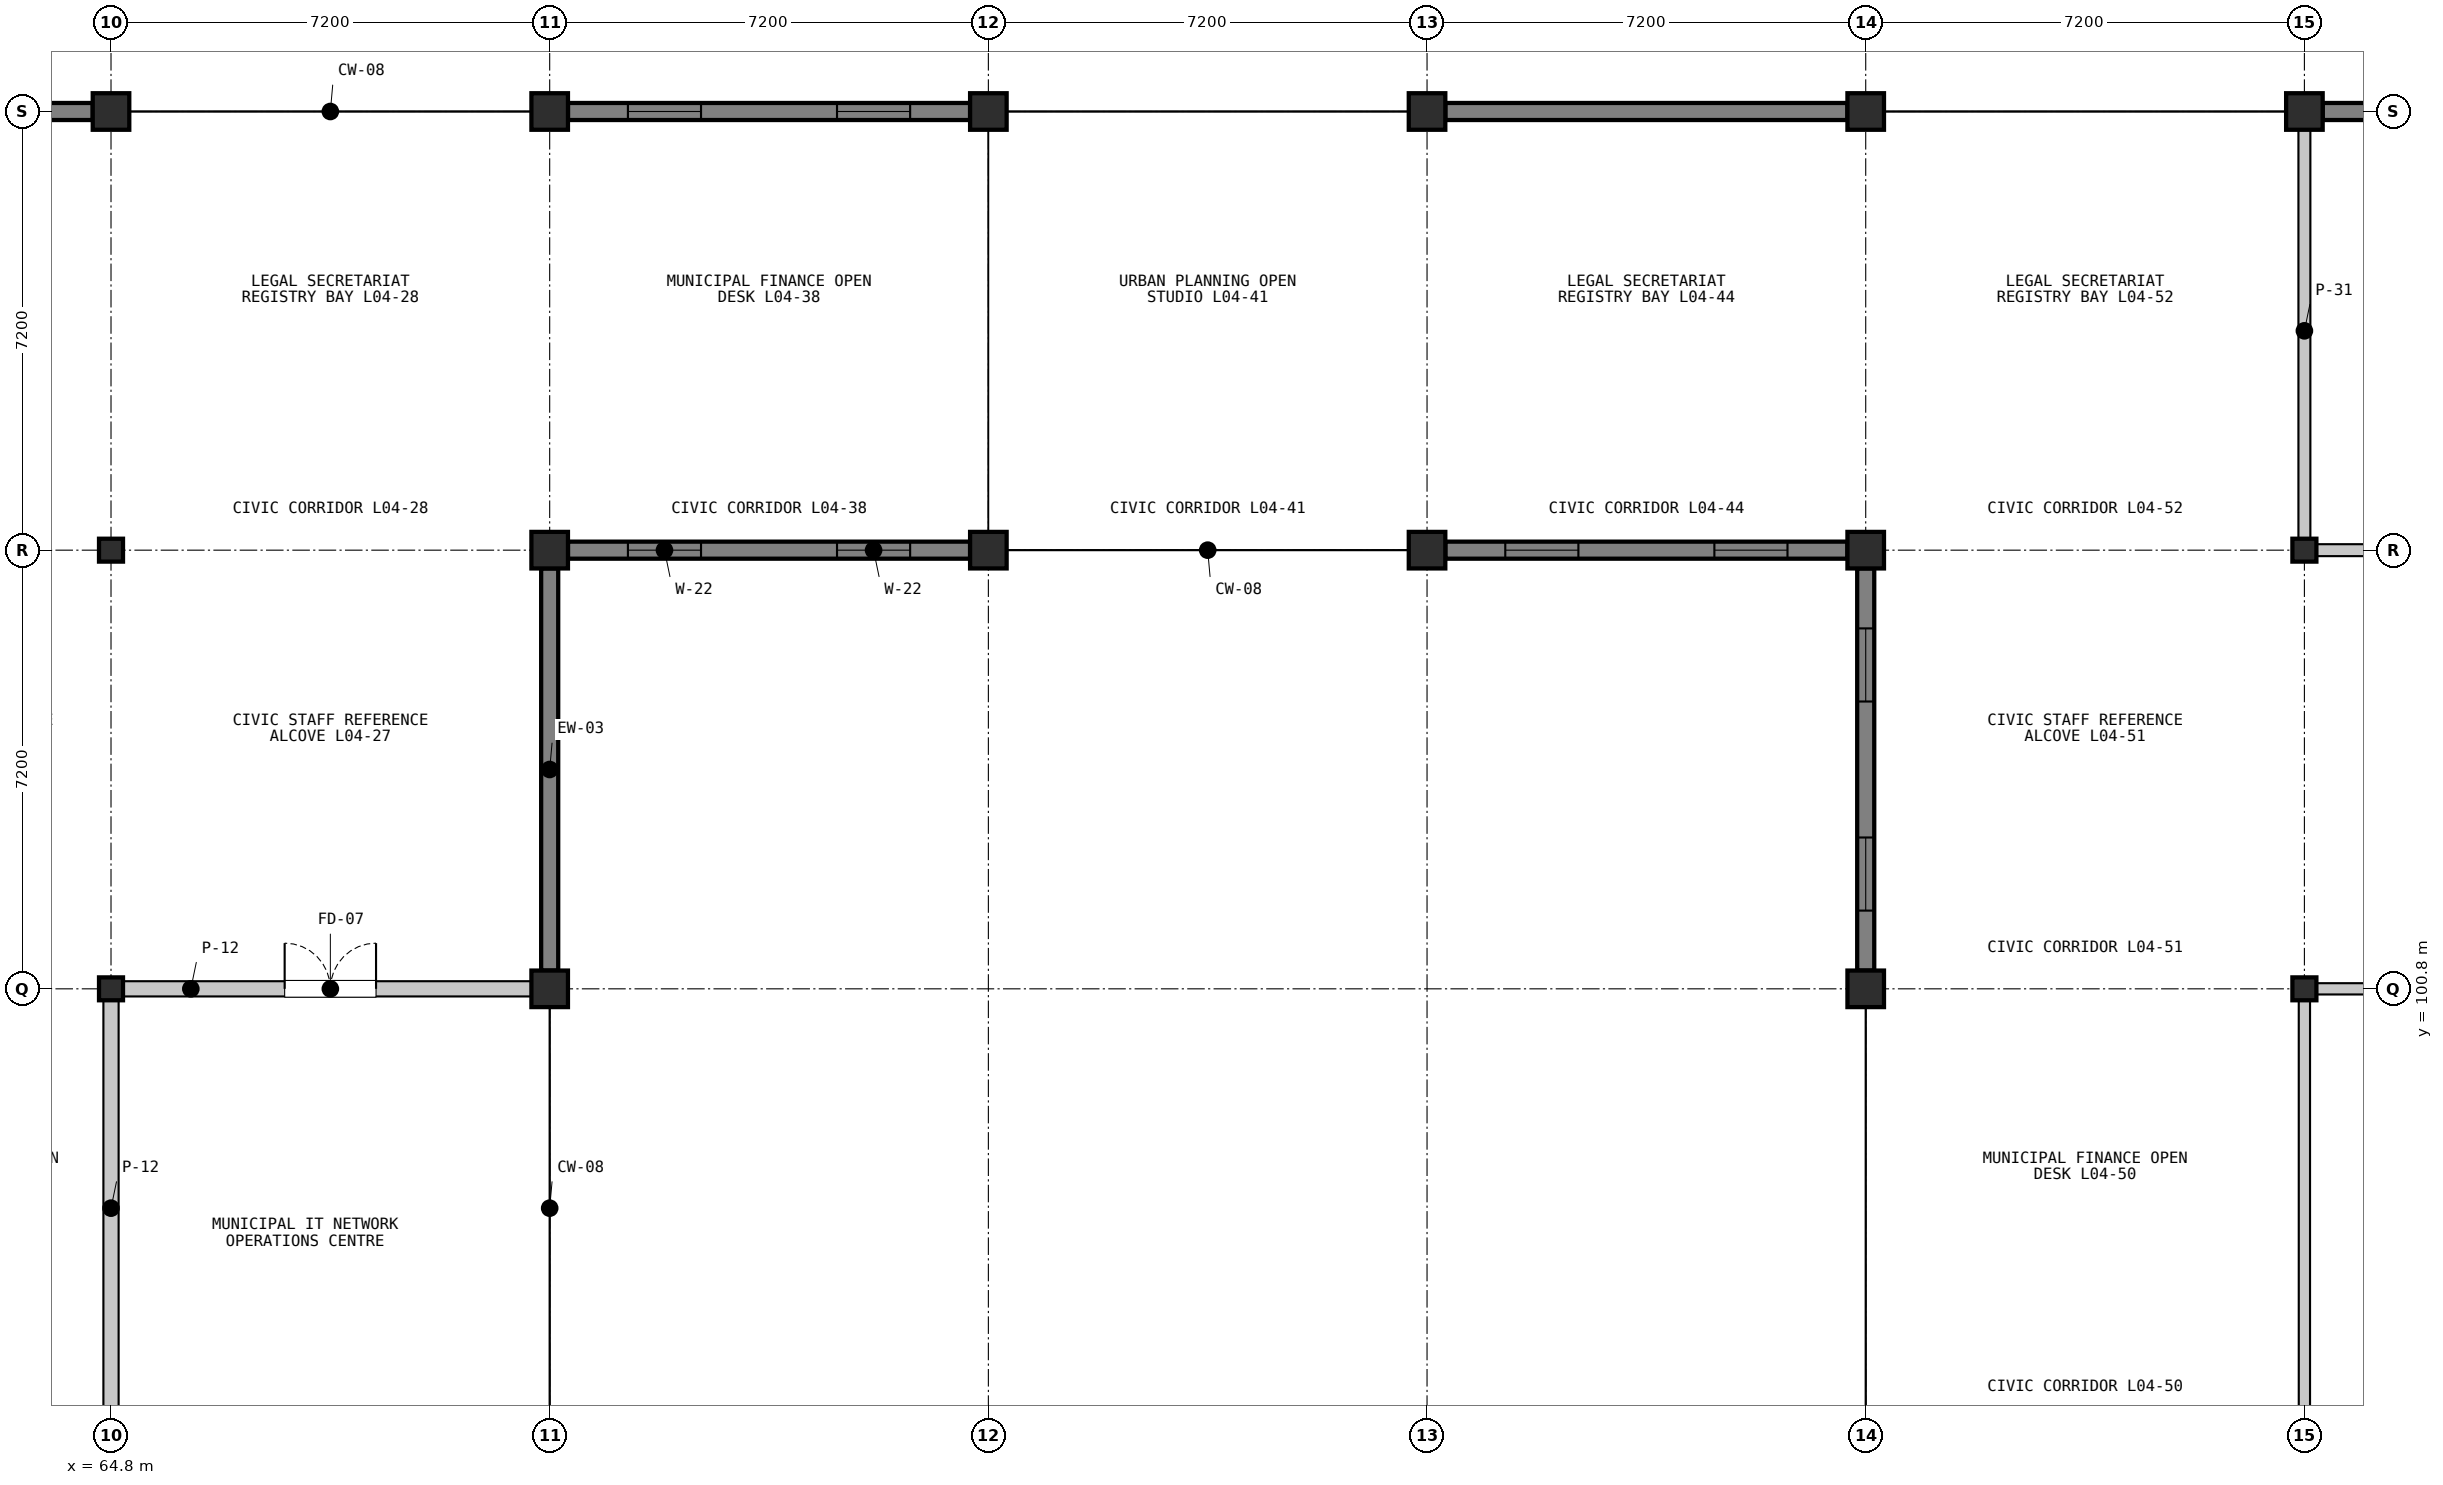
"""IFC4 building model, lengths in metres.
Left out: names, types, materials, properties, quantities, classifications, styles, units other than length and angle.
Written with IfcOpenShell. Run it as: python <this file> out.ifc"""

import sys

from ifc_helpers import new_model, si_unit, direction, frame, frame_2d, origin, origin_2d, place, context, subcontext, project, spatial, rectangle, i_section, extrude, element, fill, save


model = new_model("IFC4")
c1 = context("Model", 3, precision=1e-05, world=origin(), true_north=direction((0.0, 1.0)))
c2 = subcontext(c1, "Body", "Model", "MODEL_VIEW")
j1 = project(units=[si_unit("LENGTHUNIT", "METRE"), si_unit("PLANEANGLEUNIT", "RADIAN")], contexts=[c1])
p1 = place(None, origin())
s1 = spatial("IfcSite", under=j1, at=p1, CompositionType="ELEMENT")
p2 = place(p1, origin())
s2 = spatial("IfcBuilding", under=s1, at=p2, CompositionType="ELEMENT")
p3 = place(p2, frame((0.0, 0.0, 14.1)))
s3 = spatial("IfcBuildingStorey", under=s2, at=p3, CompositionType="ELEMENT", Elevation=14.1)
for number, where, z_axis, x_axis in (
    (1, (64.8, 100.8, 0.0), (0.0, 0.0, 1.0), (1.0, 0.0, 0.0)),
    (2, (64.8, 108.0, 0.0), (0.0, 0.0, 1.0), (1.0, 0.0, 0.0)),
):
    element("IfcColumn", number, at=place(p3, frame(where, z_axis=z_axis, x_axis=x_axis)), inside=s3, PredefinedType="COLUMN", context=c2, shape_type="SweptSolid", body=[
        extrude(i_section(OverallWidth=0.394, OverallDepth=0.376, WebThickness=0.017, FlangeThickness=0.028, FilletRadius=0.015, at=origin_2d()), origin(), (0.0, 0.0, 1.0), 3.9),
    ])
for number, where, z_axis, x_axis in (
    (3, (64.8, 115.2, 0.0), (0.0, 0.0, 1.0), (1.0, 0.0, 0.0)),
    (4, (72.0, 100.8, 0.0), (0.0, 0.0, 1.0), (1.0, 0.0, 0.0)),
    (5, (72.0, 108.0, 0.0), (0.0, 0.0, 1.0), (1.0, 0.0, 0.0)),
    (6, (72.0, 115.2, 0.0), (0.0, 0.0, 1.0), (1.0, 0.0, 0.0)),
    (7, (79.2, 108.0, 0.0), (0.0, 0.0, 1.0), (1.0, 0.0, 0.0)),
    (8, (79.2, 115.2, 0.0), (0.0, 0.0, 1.0), (1.0, 0.0, 0.0)),
    (9, (86.4, 108.0, 0.0), (0.0, 0.0, 1.0), (1.0, 0.0, 0.0)),
    (10, (86.4, 115.2, 0.0), (0.0, 0.0, 1.0), (1.0, 0.0, 0.0)),
    (11, (93.6, 100.8, 0.0), (0.0, 0.0, 1.0), (1.0, 0.0, 0.0)),
    (12, (93.6, 108.0, 0.0), (0.0, 0.0, 1.0), (1.0, 0.0, 0.0)),
    (13, (93.6, 115.2, 0.0), (0.0, 0.0, 1.0), (1.0, 0.0, 0.0)),
):
    element("IfcColumn", number, at=place(p3, frame(where, z_axis=z_axis, x_axis=x_axis)), inside=s3, PredefinedType="COLUMN", context=c2, shape_type="SweptSolid", body=[
        extrude(rectangle(XDim=0.6, YDim=0.6, at=origin_2d()), origin(), (0.0, 0.0, 1.0), 3.9),
    ])
for number, where, z_axis, x_axis in (
    (14, (100.8, 100.8, 0.0), (0.0, 0.0, 1.0), (1.0, 0.0, 0.0)),
    (15, (100.8, 108.0, 0.0), (0.0, 0.0, 1.0), (1.0, 0.0, 0.0)),
):
    element("IfcColumn", number, at=place(p3, frame(where, z_axis=z_axis, x_axis=x_axis)), inside=s3, PredefinedType="COLUMN", context=c2, shape_type="SweptSolid", body=[
        extrude(i_section(OverallWidth=0.394, OverallDepth=0.376, WebThickness=0.017, FlangeThickness=0.028, FilletRadius=0.015, at=origin_2d()), origin(), (0.0, 0.0, 1.0), 3.9),
    ])
p4 = place(p3, frame((100.8, 115.2, 0.0), z_axis=(0.0, 0.0, 1.0), x_axis=(1.0, 0.0, 0.0)))
e16 = element("IfcColumn", 16, at=p4, inside=s3, PredefinedType="COLUMN", context=c2, shape_type="SweptSolid", body=[
    extrude(rectangle(XDim=0.6, YDim=0.6, at=origin_2d()), origin(), (0.0, 0.0, 1.0), 3.9),
])
p5 = place(p3, frame((57.9, 115.2, 0.0), z_axis=(0.0, 0.0, 1.0), x_axis=(1.0, 0.0, 0.0)))
e17 = element("IfcWall", 17, at=p5, inside=s3, PredefinedType="SOLIDWALL", context=c2, shape_type="SweptSolid", body=[
    extrude(rectangle(XDim=6.6, YDim=0.28, at=frame_2d((3.3, 0.0))), origin(), (0.0, 0.0, 1.0), 3.118),
])
p6 = place(p5, frame((0.984, 0.0, 0.95)))
e18 = element("IfcOpeningElement", 18, at=p6, cuts=e17, PredefinedType="OPENING", context=c2, shape_type="SweptSolid", body=[
    extrude(rectangle(XDim=1.2, YDim=1.7, at=frame_2d((0.6, 0.85))), frame((0.0, 0.15, 0.0), z_axis=(0.0, -1.0, 0.0), x_axis=(1.0, 0.0, 0.0)), (0.0, 0.0, 1.0), 0.3),
])
p7 = place(p5, frame((4.416, 0.0, 0.95)))
e19 = element("IfcOpeningElement", 19, at=p7, cuts=e17, PredefinedType="OPENING", context=c2, shape_type="SweptSolid", body=[
    extrude(rectangle(XDim=1.2, YDim=1.7, at=frame_2d((0.6, 0.85))), frame((0.0, 0.15, 0.0), z_axis=(0.0, -1.0, 0.0), x_axis=(1.0, 0.0, 0.0)), (0.0, 0.0, 1.0), 0.3),
])
p8 = place(p3, frame((72.0, 107.7, 0.0), z_axis=(0.0, 0.0, 1.0), x_axis=(0.0, -1.0, 0.0)))
e20 = element("IfcWall", 20, at=p8, inside=s3, PredefinedType="SOLIDWALL", context=c2, shape_type="SweptSolid", body=[
    extrude(rectangle(XDim=6.6, YDim=0.28, at=frame_2d((3.3, 0.0))), origin(), (0.0, 0.0, 1.0), 3.192),
])
p9 = place(p3, frame((78.9, 108.0, 0.0), z_axis=(0.0, 0.0, 1.0), x_axis=(-1.0, 0.0, 0.0)))
e21 = element("IfcWall", 21, at=p9, inside=s3, PredefinedType="SOLIDWALL", context=c2, shape_type="SweptSolid", body=[
    extrude(rectangle(XDim=6.6, YDim=0.28, at=frame_2d((3.3, 0.0))), origin(), (0.0, 0.0, 1.0), 3.118),
])
p10 = place(p9, frame((0.984, 0.0, 0.95)))
e22 = element("IfcOpeningElement", 22, at=p10, cuts=e21, PredefinedType="OPENING", context=c2, shape_type="SweptSolid", body=[
    extrude(rectangle(XDim=1.2, YDim=1.7, at=frame_2d((0.6, 0.85))), frame((0.0, 0.15, 0.0), z_axis=(0.0, -1.0, 0.0), x_axis=(1.0, 0.0, 0.0)), (0.0, 0.0, 1.0), 0.3),
])
p11 = place(p9, frame((4.416, 0.0, 0.95)))
e23 = element("IfcOpeningElement", 23, at=p11, cuts=e21, PredefinedType="OPENING", context=c2, shape_type="SweptSolid", body=[
    extrude(rectangle(XDim=1.2, YDim=1.7, at=frame_2d((0.6, 0.85))), frame((0.0, 0.15, 0.0), z_axis=(0.0, -1.0, 0.0), x_axis=(1.0, 0.0, 0.0)), (0.0, 0.0, 1.0), 0.3),
])
p12 = place(p3, frame((72.3, 115.2, 0.0), z_axis=(0.0, 0.0, 1.0), x_axis=(1.0, 0.0, 0.0)))
e24 = element("IfcWall", 24, at=p12, inside=s3, PredefinedType="SOLIDWALL", context=c2, shape_type="SweptSolid", body=[
    extrude(rectangle(XDim=6.6, YDim=0.28, at=frame_2d((3.3, 0.0))), origin(), (0.0, 0.0, 1.0), 3.118),
])
p13 = place(p12, frame((0.984, 0.0, 0.95)))
e25 = element("IfcOpeningElement", 25, at=p13, cuts=e24, PredefinedType="OPENING", context=c2, shape_type="SweptSolid", body=[
    extrude(rectangle(XDim=1.2, YDim=1.7, at=frame_2d((0.6, 0.85))), frame((0.0, 0.15, 0.0), z_axis=(0.0, -1.0, 0.0), x_axis=(1.0, 0.0, 0.0)), (0.0, 0.0, 1.0), 0.3),
])
p14 = place(p12, frame((4.416, 0.0, 0.95)))
e26 = element("IfcOpeningElement", 26, at=p14, cuts=e24, PredefinedType="OPENING", context=c2, shape_type="SweptSolid", body=[
    extrude(rectangle(XDim=1.2, YDim=1.7, at=frame_2d((0.6, 0.85))), frame((0.0, 0.15, 0.0), z_axis=(0.0, -1.0, 0.0), x_axis=(1.0, 0.0, 0.0)), (0.0, 0.0, 1.0), 0.3),
])
p15 = place(p3, frame((93.3, 108.0, 0.0), z_axis=(0.0, 0.0, 1.0), x_axis=(-1.0, 0.0, 0.0)))
e27 = element("IfcWall", 27, at=p15, inside=s3, PredefinedType="SOLIDWALL", context=c2, shape_type="SweptSolid", body=[
    extrude(rectangle(XDim=6.6, YDim=0.28, at=frame_2d((3.3, 0.0))), origin(), (0.0, 0.0, 1.0), 3.118),
])
p16 = place(p15, frame((0.984, 0.0, 0.95)))
e28 = element("IfcOpeningElement", 28, at=p16, cuts=e27, PredefinedType="OPENING", context=c2, shape_type="SweptSolid", body=[
    extrude(rectangle(XDim=1.2, YDim=1.7, at=frame_2d((0.6, 0.85))), frame((0.0, 0.15, 0.0), z_axis=(0.0, -1.0, 0.0), x_axis=(1.0, 0.0, 0.0)), (0.0, 0.0, 1.0), 0.3),
])
p17 = place(p15, frame((4.416, 0.0, 0.95)))
e29 = element("IfcOpeningElement", 29, at=p17, cuts=e27, PredefinedType="OPENING", context=c2, shape_type="SweptSolid", body=[
    extrude(rectangle(XDim=1.2, YDim=1.7, at=frame_2d((0.6, 0.85))), frame((0.0, 0.15, 0.0), z_axis=(0.0, -1.0, 0.0), x_axis=(1.0, 0.0, 0.0)), (0.0, 0.0, 1.0), 0.3),
])
p18 = place(p3, frame((86.7, 115.2, 0.0), z_axis=(0.0, 0.0, 1.0), x_axis=(1.0, 0.0, 0.0)))
e30 = element("IfcWall", 30, at=p18, inside=s3, PredefinedType="SOLIDWALL", context=c2, shape_type="SweptSolid", body=[
    extrude(rectangle(XDim=6.6, YDim=0.28, at=frame_2d((3.3, 0.0))), origin(), (0.0, 0.0, 1.0), 3.118),
])
p19 = place(p3, frame((93.6, 101.1, 0.0), z_axis=(0.0, 0.0, 1.0), x_axis=(0.0, 1.0, 0.0)))
e31 = element("IfcWall", 31, at=p19, inside=s3, PredefinedType="SOLIDWALL", context=c2, shape_type="SweptSolid", body=[
    extrude(rectangle(XDim=6.6, YDim=0.28, at=frame_2d((3.3, 0.0))), origin(), (0.0, 0.0, 1.0), 3.192),
])
p20 = place(p19, frame((0.984, 0.0, 0.95)))
e32 = element("IfcOpeningElement", 32, at=p20, cuts=e31, PredefinedType="OPENING", context=c2, shape_type="SweptSolid", body=[
    extrude(rectangle(XDim=1.2, YDim=1.7, at=frame_2d((0.6, 0.85))), frame((0.0, 0.15, 0.0), z_axis=(0.0, -1.0, 0.0), x_axis=(1.0, 0.0, 0.0)), (0.0, 0.0, 1.0), 0.3),
])
p21 = place(p19, frame((4.416, 0.0, 0.95)))
e33 = element("IfcOpeningElement", 33, at=p21, cuts=e31, PredefinedType="OPENING", context=c2, shape_type="SweptSolid", body=[
    extrude(rectangle(XDim=1.2, YDim=1.7, at=frame_2d((0.6, 0.85))), frame((0.0, 0.15, 0.0), z_axis=(0.0, -1.0, 0.0), x_axis=(1.0, 0.0, 0.0)), (0.0, 0.0, 1.0), 0.3),
])
p22 = place(p3, frame((101.1, 115.2, 0.0), z_axis=(0.0, 0.0, 1.0), x_axis=(1.0, 0.0, 0.0)))
e34 = element("IfcWall", 34, at=p22, inside=s3, PredefinedType="SOLIDWALL", context=c2, shape_type="SweptSolid", body=[
    extrude(rectangle(XDim=6.65, YDim=0.28, at=frame_2d((3.325, 0.0))), origin(), (0.0, 0.0, 1.0), 3.098),
])
p23 = place(p22, frame((0.996, 0.0, 0.95)))
e35 = element("IfcOpeningElement", 35, at=p23, cuts=e34, PredefinedType="OPENING", context=c2, shape_type="SweptSolid", body=[
    extrude(rectangle(XDim=1.2, YDim=1.7, at=frame_2d((0.6, 0.85))), frame((0.0, 0.15, 0.0), z_axis=(0.0, -1.0, 0.0), x_axis=(1.0, 0.0, 0.0)), (0.0, 0.0, 1.0), 0.3),
])
p24 = place(p22, frame((4.454, 0.0, 0.95)))
e36 = element("IfcOpeningElement", 36, at=p24, cuts=e34, PredefinedType="OPENING", context=c2, shape_type="SweptSolid", body=[
    extrude(rectangle(XDim=1.2, YDim=1.7, at=frame_2d((0.6, 0.85))), frame((0.0, 0.15, 0.0), z_axis=(0.0, -1.0, 0.0), x_axis=(1.0, 0.0, 0.0)), (0.0, 0.0, 1.0), 0.3),
])
p25 = place(p3, frame((64.92, 100.8, 0.0), z_axis=(0.0, 0.0, 1.0), x_axis=(1.0, 0.0, 0.0)))
e37 = element("IfcWall", 37, at=p25, inside=s3, PredefinedType="PARTITIONING", context=c2, shape_type="SweptSolid", body=[
    extrude(rectangle(XDim=6.96, YDim=0.25, at=frame_2d((3.48, 0.0))), origin(), (0.0, 0.0, 1.0), 3.108),
])
p26 = place(p25, frame((2.73, 0.0, 0.0)))
e38 = element("IfcOpeningElement", 38, at=p26, cuts=e37, PredefinedType="OPENING", context=c2, shape_type="SweptSolid", body=[
    extrude(rectangle(XDim=1.5, YDim=2.25, at=frame_2d((0.75, 1.125))), frame((0.0, 0.135, 0.0), z_axis=(0.0, -1.0, 0.0), x_axis=(1.0, 0.0, 0.0)), (0.0, 0.0, 1.0), 0.27),
])
p27 = place(p3, frame((64.8, 93.72, 0.0), z_axis=(0.0, 0.0, 1.0), x_axis=(0.0, 1.0, 0.0)))
e39 = element("IfcWall", 39, at=p27, inside=s3, PredefinedType="PARTITIONING", context=c2, shape_type="SweptSolid", body=[
    extrude(rectangle(XDim=6.96, YDim=0.25, at=frame_2d((3.48, 0.0))), origin(), (0.0, 0.0, 1.0), 3.108),
])
for number, where, z_axis, x_axis in (
    (40, (100.92, 100.8, 0.0), (0.0, 0.0, 1.0), (1.0, 0.0, 0.0)),
    (41, (100.8, 93.72, 0.0), (0.0, 0.0, 1.0), (0.0, 1.0, 0.0)),
):
    element("IfcWall", number, at=place(p3, frame(where, z_axis=z_axis, x_axis=x_axis)), inside=s3, PredefinedType="PARTITIONING", context=c2, shape_type="SweptSolid", body=[
        extrude(rectangle(XDim=6.96, YDim=0.185, at=frame_2d((3.48, 0.0))), origin(), (0.0, 0.0, 1.0), 3.088),
    ])
p28 = place(p3, frame((107.88, 108.0, 0.0), z_axis=(0.0, 0.0, 1.0), x_axis=(-1.0, 0.0, 0.0)))
e42 = element("IfcWall", 42, at=p28, inside=s3, PredefinedType="PARTITIONING", context=c2, shape_type="SweptSolid", body=[
    extrude(rectangle(XDim=6.96, YDim=0.196, at=frame_2d((3.48, 0.0))), origin(), (0.0, 0.0, 1.0), 3.088),
])
p29 = place(p28, frame((2.72, 0.0, 0.0)))
e43 = element("IfcOpeningElement", 43, at=p29, cuts=e42, PredefinedType="OPENING", context=c2, shape_type="SweptSolid", body=[
    extrude(rectangle(XDim=1.52, YDim=2.4, at=frame_2d((0.76, 1.2))), frame((0.0, 0.108, 0.0), z_axis=(0.0, -1.0, 0.0), x_axis=(1.0, 0.0, 0.0)), (0.0, 0.0, 1.0), 0.216),
])
p30 = place(p3, frame((100.8, 108.12, 0.0), z_axis=(0.0, 0.0, 1.0), x_axis=(0.0, 1.0, 0.0)))
e44 = element("IfcWall", 44, at=p30, inside=s3, PredefinedType="PARTITIONING", context=c2, shape_type="SweptSolid", body=[
    extrude(rectangle(XDim=6.96, YDim=0.196, at=frame_2d((3.48, 0.0))), origin(), (0.0, 0.0, 1.0), 3.088),
])
p31 = place(p10, origin())
e45 = element("IfcWindow", 45, at=p31, inside=s3, PartitioningType="SINGLE_PANEL", PredefinedType="WINDOW", context=c2, shape_type="SweptSolid", body=[
    extrude(rectangle(XDim=1.2, YDim=1.7, at=frame_2d((0.6, 0.85))), frame((0.0, 0.03, 0.0), z_axis=(0.0, -1.0, 0.0), x_axis=(1.0, 0.0, 0.0)), (0.0, 0.0, 1.0), 0.06),
])
fill(e22, e45)
p32 = place(p11, origin())
e46 = element("IfcWindow", 46, at=p32, inside=s3, PartitioningType="SINGLE_PANEL", PredefinedType="WINDOW", context=c2, shape_type="SweptSolid", body=[
    extrude(rectangle(XDim=1.2, YDim=1.7, at=frame_2d((0.6, 0.85))), frame((0.0, 0.03, 0.0), z_axis=(0.0, -1.0, 0.0), x_axis=(1.0, 0.0, 0.0)), (0.0, 0.0, 1.0), 0.06),
])
fill(e23, e46)
p33 = place(p13, origin())
e47 = element("IfcWindow", 47, at=p33, inside=s3, PartitioningType="SINGLE_PANEL", PredefinedType="WINDOW", context=c2, shape_type="SweptSolid", body=[
    extrude(rectangle(XDim=1.2, YDim=1.7, at=frame_2d((0.6, 0.85))), frame((0.0, 0.03, 0.0), z_axis=(0.0, -1.0, 0.0), x_axis=(1.0, 0.0, 0.0)), (0.0, 0.0, 1.0), 0.06),
])
fill(e25, e47)
p34 = place(p14, origin())
e48 = element("IfcWindow", 48, at=p34, inside=s3, PartitioningType="SINGLE_PANEL", PredefinedType="WINDOW", context=c2, shape_type="SweptSolid", body=[
    extrude(rectangle(XDim=1.2, YDim=1.7, at=frame_2d((0.6, 0.85))), frame((0.0, 0.03, 0.0), z_axis=(0.0, -1.0, 0.0), x_axis=(1.0, 0.0, 0.0)), (0.0, 0.0, 1.0), 0.06),
])
fill(e26, e48)
p35 = place(p16, origin())
e49 = element("IfcWindow", 49, at=p35, inside=s3, PartitioningType="SINGLE_PANEL", PredefinedType="WINDOW", context=c2, shape_type="SweptSolid", body=[
    extrude(rectangle(XDim=1.2, YDim=1.7, at=frame_2d((0.6, 0.85))), frame((0.0, 0.03, 0.0), z_axis=(0.0, -1.0, 0.0), x_axis=(1.0, 0.0, 0.0)), (0.0, 0.0, 1.0), 0.06),
])
fill(e28, e49)
p36 = place(p17, origin())
e50 = element("IfcWindow", 50, at=p36, inside=s3, PartitioningType="SINGLE_PANEL", PredefinedType="WINDOW", context=c2, shape_type="SweptSolid", body=[
    extrude(rectangle(XDim=1.2, YDim=1.7, at=frame_2d((0.6, 0.85))), frame((0.0, 0.03, 0.0), z_axis=(0.0, -1.0, 0.0), x_axis=(1.0, 0.0, 0.0)), (0.0, 0.0, 1.0), 0.06),
])
fill(e29, e50)
p37 = place(p20, origin())
e51 = element("IfcWindow", 51, at=p37, inside=s3, PartitioningType="SINGLE_PANEL", PredefinedType="WINDOW", context=c2, shape_type="SweptSolid", body=[
    extrude(rectangle(XDim=1.2, YDim=1.7, at=frame_2d((0.6, 0.85))), frame((0.0, 0.03, 0.0), z_axis=(0.0, -1.0, 0.0), x_axis=(1.0, 0.0, 0.0)), (0.0, 0.0, 1.0), 0.06),
])
fill(e32, e51)
p38 = place(p21, origin())
e52 = element("IfcWindow", 52, at=p38, inside=s3, PartitioningType="SINGLE_PANEL", PredefinedType="WINDOW", context=c2, shape_type="SweptSolid", body=[
    extrude(rectangle(XDim=1.2, YDim=1.7, at=frame_2d((0.6, 0.85))), frame((0.0, 0.03, 0.0), z_axis=(0.0, -1.0, 0.0), x_axis=(1.0, 0.0, 0.0)), (0.0, 0.0, 1.0), 0.06),
])
fill(e33, e52)
p39 = place(p26, origin())
e53 = element("IfcDoor", 53, at=p39, inside=s3, OperationType="DOUBLE_DOOR_SINGLE_SWING", PredefinedType="DOOR", context=c2, shape_type="SweptSolid", body=[
    extrude(rectangle(XDim=1.5, YDim=2.25, at=frame_2d((0.75, 1.125))), frame((0.0, 0.025, 0.0), z_axis=(0.0, -1.0, 0.0), x_axis=(1.0, 0.0, 0.0)), (0.0, 0.0, 1.0), 0.05),
])
fill(e38, e53)
save(model, sys.argv[1])
